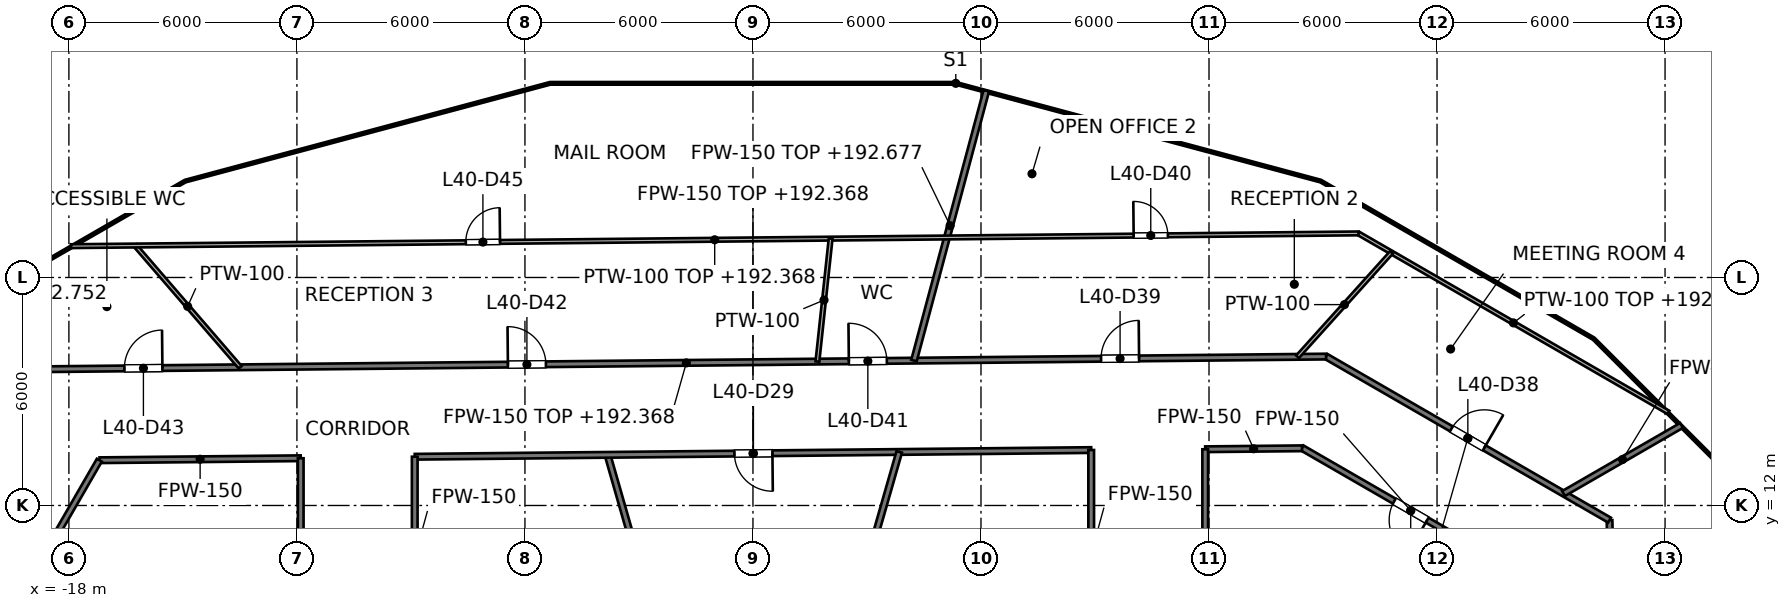
"""IFC4 building model, lengths in metres.
Left out: names, types, materials, properties, quantities, classifications, styles, units other than length and angle.
Written with IfcOpenShell. Run it as: python <this file> out.ifc"""

import sys

from ifc_helpers import new_model, si_unit, direction, frame, frame_2d, origin, place, context, subcontext, project, spatial, rectangle, extrude, element, fill, save


model = new_model("IFC4")
c1 = context("Model", 3, precision=1e-05, world=origin(), true_north=direction((0.0, 1.0)))
c2 = subcontext(c1, "Body", "Model", "MODEL_VIEW")
j1 = project(units=[si_unit("LENGTHUNIT", "METRE"), si_unit("PLANEANGLEUNIT", "RADIAN")], contexts=[c1])
p1 = place(None, origin())
s1 = spatial("IfcSite", under=j1, at=p1, CompositionType="ELEMENT")
p2 = place(p1, origin())
s2 = spatial("IfcBuilding", under=s1, at=p2, CompositionType="ELEMENT")
p3 = place(p2, frame((0.0, 0.0, 189.6)))
s3 = spatial("IfcBuildingStorey", under=s2, at=p3, CompositionType="ELEMENT", Elevation=189.6)
p4 = place(p3, frame((22.539, 11.615, 0.0), z_axis=(0.0, 0.0, 1.0), x_axis=(0.020626332176, -0.99978725458, 0.0)))
e1 = element("IfcWall", 1, at=p4, inside=s3, PredefinedType="PARTITIONING", context=c2, shape_type="SweptSolid", body=[
    extrude(rectangle(XDim=19.66, YDim=0.15, at=frame_2d((9.83, 0.0))), origin(), (0.0, 0.0, 1.0), 2.768),
])
p5 = place(p4, frame((9.33, 0.0, 0.0)))
e2 = element("IfcOpeningElement", 2, at=p5, cuts=e1, PredefinedType="OPENING", context=c2, shape_type="SweptSolid", body=[
    extrude(rectangle(XDim=1.0, YDim=2.1, at=frame_2d((0.5, 1.05))), frame((0.0, 0.075, 0.0), z_axis=(0.0, -1.0, 0.0), x_axis=(1.0, 0.0, 0.0)), (0.0, 0.0, 1.0), 0.15),
])
p6 = place(p3, frame((-3.827, 13.333, 0.0), z_axis=(0.0, 0.0, 1.0), x_axis=(0.275935525478, -0.961176147113, 0.0)))
e3 = element("IfcWall", 3, at=p6, inside=s3, PredefinedType="PARTITIONING", context=c2, shape_type="SweptSolid", body=[
    extrude(rectangle(XDim=5.548, YDim=0.15, at=frame_2d((2.774, 0.0))), origin(), (0.0, 0.0, 1.0), 3.7),
])
p7 = place(p3, frame((14.448, 13.515, 0.0), z_axis=(0.0, 0.0, 1.0), x_axis=(0.866032288321, -0.499988075443, 0.0)))
e4 = element("IfcWall", 4, at=p7, inside=s3, PredefinedType="PARTITIONING", context=c2, shape_type="SweptSolid", body=[
    extrude(rectangle(XDim=6.604, YDim=0.15, at=frame_2d((3.302, 0.0))), origin(), (0.0, 0.0, 1.0), 2.777),
])
p8 = place(p7, frame((2.802, 0.0, 0.0)))
e5 = element("IfcOpeningElement", 5, at=p8, cuts=e4, PredefinedType="OPENING", context=c2, shape_type="SweptSolid", body=[
    extrude(rectangle(XDim=1.0, YDim=2.1, at=frame_2d((0.5, 1.05))), frame((0.0, 0.075, 0.0), z_axis=(0.0, -1.0, 0.0), x_axis=(1.0, 0.0, 0.0)), (0.0, 0.0, 1.0), 0.15),
])
p9 = place(p3, frame((15.08, 15.921, 0.0), z_axis=(0.0, 0.0, 1.0), x_axis=(0.866020838546, -0.500007907142, 0.0)))
e6 = element("IfcWall", 6, at=p9, inside=s3, PredefinedType="PARTITIONING", context=c2, shape_type="SweptSolid", body=[
    extrude(rectangle(XDim=8.613, YDim=0.15, at=frame_2d((4.306, 0.0))), origin(), (0.0, 0.0, 1.0), 2.777),
])
p10 = place(p9, frame((3.808, 0.0, 0.0)))
e7 = element("IfcOpeningElement", 7, at=p10, cuts=e6, PredefinedType="OPENING", context=c2, shape_type="SweptSolid", body=[
    extrude(rectangle(XDim=1.0, YDim=2.1, at=frame_2d((0.5, 1.05))), frame((0.0, 0.075, 0.0), z_axis=(0.0, -1.0, 0.0), x_axis=(1.0, 0.0, 0.0)), (0.0, 0.0, 1.0), 0.15),
])
p11 = place(p3, frame((-17.194, 13.191, 0.0), z_axis=(0.0, 0.0, 1.0), x_axis=(0.999950853109, 0.009914200296, 0.0)))
e8 = element("IfcWall", 8, at=p11, inside=s3, PredefinedType="PARTITIONING", context=c2, shape_type="SweptSolid", body=[
    extrude(rectangle(XDim=5.294, YDim=0.15, at=frame_2d((2.647, 0.0))), origin(), (0.0, 0.0, 1.0), 2.777),
])
p12 = place(p3, frame((-8.9, 13.282, 0.0), z_axis=(0.0, 0.0, 1.0), x_axis=(0.999951241216, 0.009874977968, 0.0)))
e9 = element("IfcWall", 9, at=p12, inside=s3, PredefinedType="PARTITIONING", context=c2, shape_type="SweptSolid", body=[
    extrude(rectangle(XDim=17.801, YDim=0.15, at=frame_2d((8.9, 0.0))), origin(), (0.0, 0.0, 1.0), 2.768),
])
p13 = place(p12, frame((8.413, 0.0, 0.0)))
e10 = element("IfcOpeningElement", 10, at=p13, cuts=e9, PredefinedType="OPENING", context=c2, shape_type="SweptSolid", body=[
    extrude(rectangle(XDim=1.0, YDim=2.1, at=frame_2d((0.5, 1.05))), frame((0.0, 0.075, 0.0), z_axis=(0.0, -1.0, 0.0), x_axis=(1.0, 0.0, 0.0)), (0.0, 0.0, 1.0), 0.15),
])
p14 = place(p3, frame((11.9, 13.48, 0.0), z_axis=(0.0, 0.0, 1.0), x_axis=(0.999951307579, 0.009868255694, 0.0)))
e11 = element("IfcWall", 11, at=p14, inside=s3, PredefinedType="PARTITIONING", context=c2, shape_type="SweptSolid", body=[
    extrude(rectangle(XDim=2.548, YDim=0.15, at=frame_2d((1.274, 0.0))), origin(), (0.0, 0.0, 1.0), 2.777),
])
p15 = place(p3, frame((-18.587, 15.586, 0.0), z_axis=(0.0, 0.0, 1.0), x_axis=(0.999951300332, 0.009868989991, 0.0)))
e12 = element("IfcWall", 12, at=p15, inside=s3, PredefinedType="PARTITIONING", context=c2, shape_type="SweptSolid", body=[
    extrude(rectangle(XDim=33.669, YDim=0.15, at=frame_2d((16.834, 0.0))), origin(), (0.0, 0.0, 1.0), 2.768),
])
p16 = place(p15, frame((27.749, 0.0, 0.0)))
e13 = element("IfcOpeningElement", 13, at=p16, cuts=e12, PredefinedType="OPENING", context=c2, shape_type="SweptSolid", body=[
    extrude(rectangle(XDim=1.0, YDim=2.1, at=frame_2d((0.5, 1.05))), frame((0.0, 0.075, 0.0), z_axis=(0.0, -1.0, 0.0), x_axis=(1.0, 0.0, 0.0)), (0.0, 0.0, 1.0), 0.15),
])
p17 = place(p15, frame((21.111, 0.0, 0.0)))
e14 = element("IfcOpeningElement", 14, at=p17, cuts=e12, PredefinedType="OPENING", context=c2, shape_type="SweptSolid", body=[
    extrude(rectangle(XDim=1.0, YDim=2.1, at=frame_2d((0.5, 1.05))), frame((0.0, 0.075, 0.0), z_axis=(0.0, -1.0, 0.0), x_axis=(1.0, 0.0, 0.0)), (0.0, 0.0, 1.0), 0.15),
])
p18 = place(p15, frame((12.139, 0.0, 0.0)))
e15 = element("IfcOpeningElement", 15, at=p18, cuts=e12, PredefinedType="OPENING", context=c2, shape_type="SweptSolid", body=[
    extrude(rectangle(XDim=1.0, YDim=2.1, at=frame_2d((0.5, 1.05))), frame((0.0, 0.075, 0.0), z_axis=(0.0, -1.0, 0.0), x_axis=(1.0, 0.0, 0.0)), (0.0, 0.0, 1.0), 0.15),
])
p19 = place(p15, frame((2.048, 0.0, 0.0)))
e16 = element("IfcOpeningElement", 16, at=p19, cuts=e12, PredefinedType="OPENING", context=c2, shape_type="SweptSolid", body=[
    extrude(rectangle(XDim=1.0, YDim=2.1, at=frame_2d((0.5, 1.05))), frame((0.0, 0.075, 0.0), z_axis=(0.0, -1.0, 0.0), x_axis=(1.0, 0.0, 0.0)), (0.0, 0.0, 1.0), 0.15),
])
p20 = place(p3, frame((21.329, 12.314, 0.0), z_axis=(0.0, 0.0, 1.0), x_axis=(0.866038125567, 0.499977964579, 0.0)))
e17 = element("IfcWall", 17, at=p20, inside=s3, PredefinedType="PARTITIONING", context=c2, shape_type="SweptSolid", body=[
    extrude(rectangle(XDim=3.584, YDim=0.15, at=frame_2d((1.792, 0.0))), origin(), (0.0, 0.0, 1.0), 2.845),
])
p21 = place(p3, frame((-20.5, 7.474, 0.0), z_axis=(0.0, 0.0, 1.0), x_axis=(0.499957196903, 0.866050114754, 0.0)))
e18 = element("IfcWall", 18, at=p21, inside=s3, PredefinedType="PARTITIONING", context=c2, shape_type="SweptSolid", body=[
    extrude(rectangle(XDim=6.602, YDim=0.15, at=frame_2d((3.301, 0.0))), origin(), (0.0, 0.0, 1.0), 2.777),
])
p22 = place(p21, frame((2.802, 0.0, 0.0)))
e19 = element("IfcOpeningElement", 19, at=p22, cuts=e18, PredefinedType="OPENING", context=c2, shape_type="SweptSolid", body=[
    extrude(rectangle(XDim=1.0, YDim=2.1, at=frame_2d((0.5, 1.05))), frame((0.0, 0.075, 0.0), z_axis=(0.0, -1.0, 0.0), x_axis=(1.0, 0.0, 0.0)), (0.0, 0.0, 1.0), 0.15),
])
p23 = place(p3, frame((2.296, 8.0, 0.0), z_axis=(0.0, 0.0, 1.0), x_axis=(0.275958345059, 0.961169595749, 0.0)))
e20 = element("IfcWall", 20, at=p23, inside=s3, PredefinedType="PARTITIONING", context=c2, shape_type="SweptSolid", body=[
    extrude(rectangle(XDim=5.628, YDim=0.15, at=frame_2d((2.814, 0.0))), origin(), (0.0, 0.0, 1.0), 3.7),
])
p24 = place(p3, frame((4.237, 15.813, 0.0), z_axis=(0.0, 0.0, 1.0), x_axis=(0.258799155252, 0.965931155539, 0.0)))
e21 = element("IfcWall", 21, at=p24, inside=s3, PredefinedType="PARTITIONING", context=c2, shape_type="SweptSolid", body=[
    extrude(rectangle(XDim=7.353, YDim=0.15, at=frame_2d((3.676, 0.0))), origin(), (0.0, 0.0, 1.0), 3.077),
])
p25 = place(p3, frame((11.9, 8.0, 0.0), z_axis=(0.0, 0.0, 1.0), x_axis=(0.0, 1.0, 0.0)))
e22 = element("IfcWall", 22, at=p25, inside=s3, PredefinedType="PARTITIONING", context=c2, shape_type="SweptSolid", body=[
    extrude(rectangle(XDim=5.479, YDim=0.15, at=frame_2d((2.74, 0.0))), origin(), (0.0, 0.0, 1.0), 2.777),
])
p26 = place(p3, frame((8.9, 8.0, 0.0), z_axis=(0.0, 0.0, 1.0), x_axis=(0.0, 1.0, 0.0)))
e23 = element("IfcWall", 23, at=p26, inside=s3, PredefinedType="PARTITIONING", context=c2, shape_type="SweptSolid", body=[
    extrude(rectangle(XDim=5.46, YDim=0.15, at=frame_2d((2.73, 0.0))), origin(), (0.0, 0.0, 1.0), 2.777),
])
p27 = place(p26, frame((2.23, 0.0, 0.0)))
e24 = element("IfcOpeningElement", 24, at=p27, cuts=e23, PredefinedType="OPENING", context=c2, shape_type="SweptSolid", body=[
    extrude(rectangle(XDim=1.0, YDim=2.1, at=frame_2d((0.5, 1.05))), frame((0.0, 0.075, 0.0), z_axis=(0.0, -1.0, 0.0), x_axis=(1.0, 0.0, 0.0)), (0.0, 0.0, 1.0), 0.15),
])
p28 = place(p3, frame((-8.9, 8.0, 0.0), z_axis=(0.0, 0.0, 1.0), x_axis=(0.0, 1.0, 0.0)))
e25 = element("IfcWall", 25, at=p28, inside=s3, PredefinedType="PARTITIONING", context=c2, shape_type="SweptSolid", body=[
    extrude(rectangle(XDim=5.283, YDim=0.15, at=frame_2d((2.642, 0.0))), origin(), (0.0, 0.0, 1.0), 2.777),
])
p29 = place(p28, frame((2.142, 0.0, 0.0)))
e26 = element("IfcOpeningElement", 26, at=p29, cuts=e25, PredefinedType="OPENING", context=c2, shape_type="SweptSolid", body=[
    extrude(rectangle(XDim=1.0, YDim=2.1, at=frame_2d((0.5, 1.05))), frame((0.0, 0.075, 0.0), z_axis=(0.0, -1.0, 0.0), x_axis=(1.0, 0.0, 0.0)), (0.0, 0.0, 1.0), 0.15),
])
p30 = place(p3, frame((-11.9, 8.0, 0.0), z_axis=(0.0, 0.0, 1.0), x_axis=(0.0, 1.0, 0.0)))
e27 = element("IfcWall", 27, at=p30, inside=s3, PredefinedType="PARTITIONING", context=c2, shape_type="SweptSolid", body=[
    extrude(rectangle(XDim=5.243, YDim=0.15, at=frame_2d((2.622, 0.0))), origin(), (0.0, 0.0, 1.0), 2.777),
])
p31 = place(p3, frame((-16.257, 18.841, 0.0), z_axis=(0.0, 0.0, 1.0), x_axis=(0.653325359449, -0.757077258079, 0.0)))
e28 = element("IfcWall", 28, at=p31, inside=s3, PredefinedType="PARTITIONING", context=c2, shape_type="SweptSolid", body=[
    extrude(rectangle(XDim=4.231, YDim=0.1, at=frame_2d((2.115, 0.0))), origin(), (0.0, 0.0, 1.0), 3.7),
])
p32 = place(p3, frame((15.931, 19.16, 0.0), z_axis=(0.0, 0.0, 1.0), x_axis=(0.86598056092, -0.500077662076, 0.0)))
e29 = element("IfcWall", 29, at=p32, inside=s3, PredefinedType="PARTITIONING", context=c2, shape_type="SweptSolid", body=[
    extrude(rectangle(XDim=9.42, YDim=0.1, at=frame_2d((4.71, 0.0))), origin(), (0.0, 0.0, 1.0), 2.777),
])
p33 = place(p3, frame((-17.945, 18.824, 0.0), z_axis=(0.0, 0.0, 1.0), x_axis=(0.999950833273, 0.009916200716, 0.0)))
e30 = element("IfcWall", 30, at=p33, inside=s3, PredefinedType="PARTITIONING", context=c2, shape_type="SweptSolid", body=[
    extrude(rectangle(XDim=33.878, YDim=0.1, at=frame_2d((16.939, 0.0))), origin(), (0.0, 0.0, 1.0), 2.768),
])
p34 = place(p33, frame((27.964, 0.0, 0.0)))
e31 = element("IfcOpeningElement", 31, at=p34, cuts=e30, PredefinedType="OPENING", context=c2, shape_type="SweptSolid", body=[
    extrude(rectangle(XDim=0.9, YDim=2.1, at=frame_2d((0.45, 1.05))), frame((0.0, 0.05, 0.0), z_axis=(0.0, -1.0, 0.0), x_axis=(1.0, 0.0, 0.0)), (0.0, 0.0, 1.0), 0.1),
])
p35 = place(p33, frame((10.39, 0.0, 0.0)))
e32 = element("IfcOpeningElement", 32, at=p35, cuts=e30, PredefinedType="OPENING", context=c2, shape_type="SweptSolid", body=[
    extrude(rectangle(XDim=0.9, YDim=2.1, at=frame_2d((0.45, 1.05))), frame((0.0, 0.05, 0.0), z_axis=(0.0, -1.0, 0.0), x_axis=(1.0, 0.0, 0.0)), (0.0, 0.0, 1.0), 0.1),
])
p36 = place(p3, frame((14.329, 15.914, 0.0), z_axis=(0.0, 0.0, 1.0), x_axis=(0.669180226247, 0.74310014453, 0.0)))
e33 = element("IfcWall", 33, at=p36, inside=s3, PredefinedType="PARTITIONING", context=c2, shape_type="SweptSolid", body=[
    extrude(rectangle(XDim=3.692, YDim=0.1, at=frame_2d((1.846, 0.0))), origin(), (0.0, 0.0, 1.0), 3.7),
])
p37 = place(p3, frame((1.696, 15.788, 0.0), z_axis=(0.0, 0.0, 1.0), x_axis=(0.106930547304, 0.994266492472, 0.0)))
e34 = element("IfcWall", 34, at=p37, inside=s3, PredefinedType="PARTITIONING", context=c2, shape_type="SweptSolid", body=[
    extrude(rectangle(XDim=3.253, YDim=0.1, at=frame_2d((1.627, 0.0))), origin(), (0.0, 0.0, 1.0), 3.7),
])
p38 = place(p8, origin())
e35 = element("IfcDoor", 35, at=p38, inside=s3, OperationType="SINGLE_SWING_RIGHT", PredefinedType="DOOR", context=c2, shape_type="SweptSolid", body=[
    extrude(rectangle(XDim=1.0, YDim=2.1, at=frame_2d((0.5, 1.05))), frame((0.0, 0.025, 0.0), z_axis=(0.0, -1.0, 0.0), x_axis=(1.0, 0.0, 0.0)), (0.0, 0.0, 1.0), 0.05),
])
fill(e5, e35)
p39 = place(p13, origin())
e36 = element("IfcDoor", 36, at=p39, inside=s3, OperationType="SINGLE_SWING_RIGHT", PredefinedType="DOOR", context=c2, shape_type="SweptSolid", body=[
    extrude(rectangle(XDim=1.0, YDim=2.1, at=frame_2d((0.5, 1.05))), frame((0.0, 0.025, 0.0), z_axis=(0.0, -1.0, 0.0), x_axis=(1.0, 0.0, 0.0)), (0.0, 0.0, 1.0), 0.05),
])
fill(e10, e36)
p40 = place(p10, origin())
e37 = element("IfcDoor", 37, at=p40, inside=s3, OperationType="SINGLE_SWING_RIGHT", PredefinedType="DOOR", context=c2, shape_type="SweptSolid", body=[
    extrude(rectangle(XDim=1.0, YDim=2.1, at=frame_2d((0.5, 1.05))), frame((0.0, 0.025, 0.0), z_axis=(0.0, -1.0, 0.0), x_axis=(1.0, 0.0, 0.0)), (0.0, 0.0, 1.0), 0.05),
])
fill(e7, e37)
p41 = place(p16, origin())
e38 = element("IfcDoor", 38, at=p41, inside=s3, OperationType="SINGLE_SWING_RIGHT", PredefinedType="DOOR", context=c2, shape_type="SweptSolid", body=[
    extrude(rectangle(XDim=1.0, YDim=2.1, at=frame_2d((0.5, 1.05))), frame((0.0, 0.025, 0.0), z_axis=(0.0, -1.0, 0.0), x_axis=(1.0, 0.0, 0.0)), (0.0, 0.0, 1.0), 0.05),
])
fill(e13, e38)
p42 = place(p34, origin())
e39 = element("IfcDoor", 39, at=p42, inside=s3, OperationType="SINGLE_SWING_LEFT", PredefinedType="DOOR", context=c2, shape_type="SweptSolid", body=[
    extrude(rectangle(XDim=0.9, YDim=2.1, at=frame_2d((0.45, 1.05))), frame((0.0, 0.025, 0.0), z_axis=(0.0, -1.0, 0.0), x_axis=(1.0, 0.0, 0.0)), (0.0, 0.0, 1.0), 0.05),
])
fill(e31, e39)
p43 = place(p17, origin())
e40 = element("IfcDoor", 40, at=p43, inside=s3, OperationType="SINGLE_SWING_LEFT", PredefinedType="DOOR", context=c2, shape_type="SweptSolid", body=[
    extrude(rectangle(XDim=1.0, YDim=2.1, at=frame_2d((0.5, 1.05))), frame((0.0, 0.025, 0.0), z_axis=(0.0, -1.0, 0.0), x_axis=(1.0, 0.0, 0.0)), (0.0, 0.0, 1.0), 0.05),
])
fill(e14, e40)
p44 = place(p18, origin())
e41 = element("IfcDoor", 41, at=p44, inside=s3, OperationType="SINGLE_SWING_LEFT", PredefinedType="DOOR", context=c2, shape_type="SweptSolid", body=[
    extrude(rectangle(XDim=1.0, YDim=2.1, at=frame_2d((0.5, 1.05))), frame((0.0, 0.025, 0.0), z_axis=(0.0, -1.0, 0.0), x_axis=(1.0, 0.0, 0.0)), (0.0, 0.0, 1.0), 0.05),
])
fill(e15, e41)
p45 = place(p19, origin())
e42 = element("IfcDoor", 42, at=p45, inside=s3, OperationType="SINGLE_SWING_RIGHT", PredefinedType="DOOR", context=c2, shape_type="SweptSolid", body=[
    extrude(rectangle(XDim=1.0, YDim=2.1, at=frame_2d((0.5, 1.05))), frame((0.0, 0.025, 0.0), z_axis=(0.0, -1.0, 0.0), x_axis=(1.0, 0.0, 0.0)), (0.0, 0.0, 1.0), 0.05),
])
fill(e16, e42)
p46 = place(p35, origin())
e43 = element("IfcDoor", 43, at=p46, inside=s3, OperationType="SINGLE_SWING_RIGHT", PredefinedType="DOOR", context=c2, shape_type="SweptSolid", body=[
    extrude(rectangle(XDim=0.9, YDim=2.1, at=frame_2d((0.45, 1.05))), frame((0.0, 0.025, 0.0), z_axis=(0.0, -1.0, 0.0), x_axis=(1.0, 0.0, 0.0)), (0.0, 0.0, 1.0), 0.05),
])
fill(e32, e43)
save(model, sys.argv[1])
